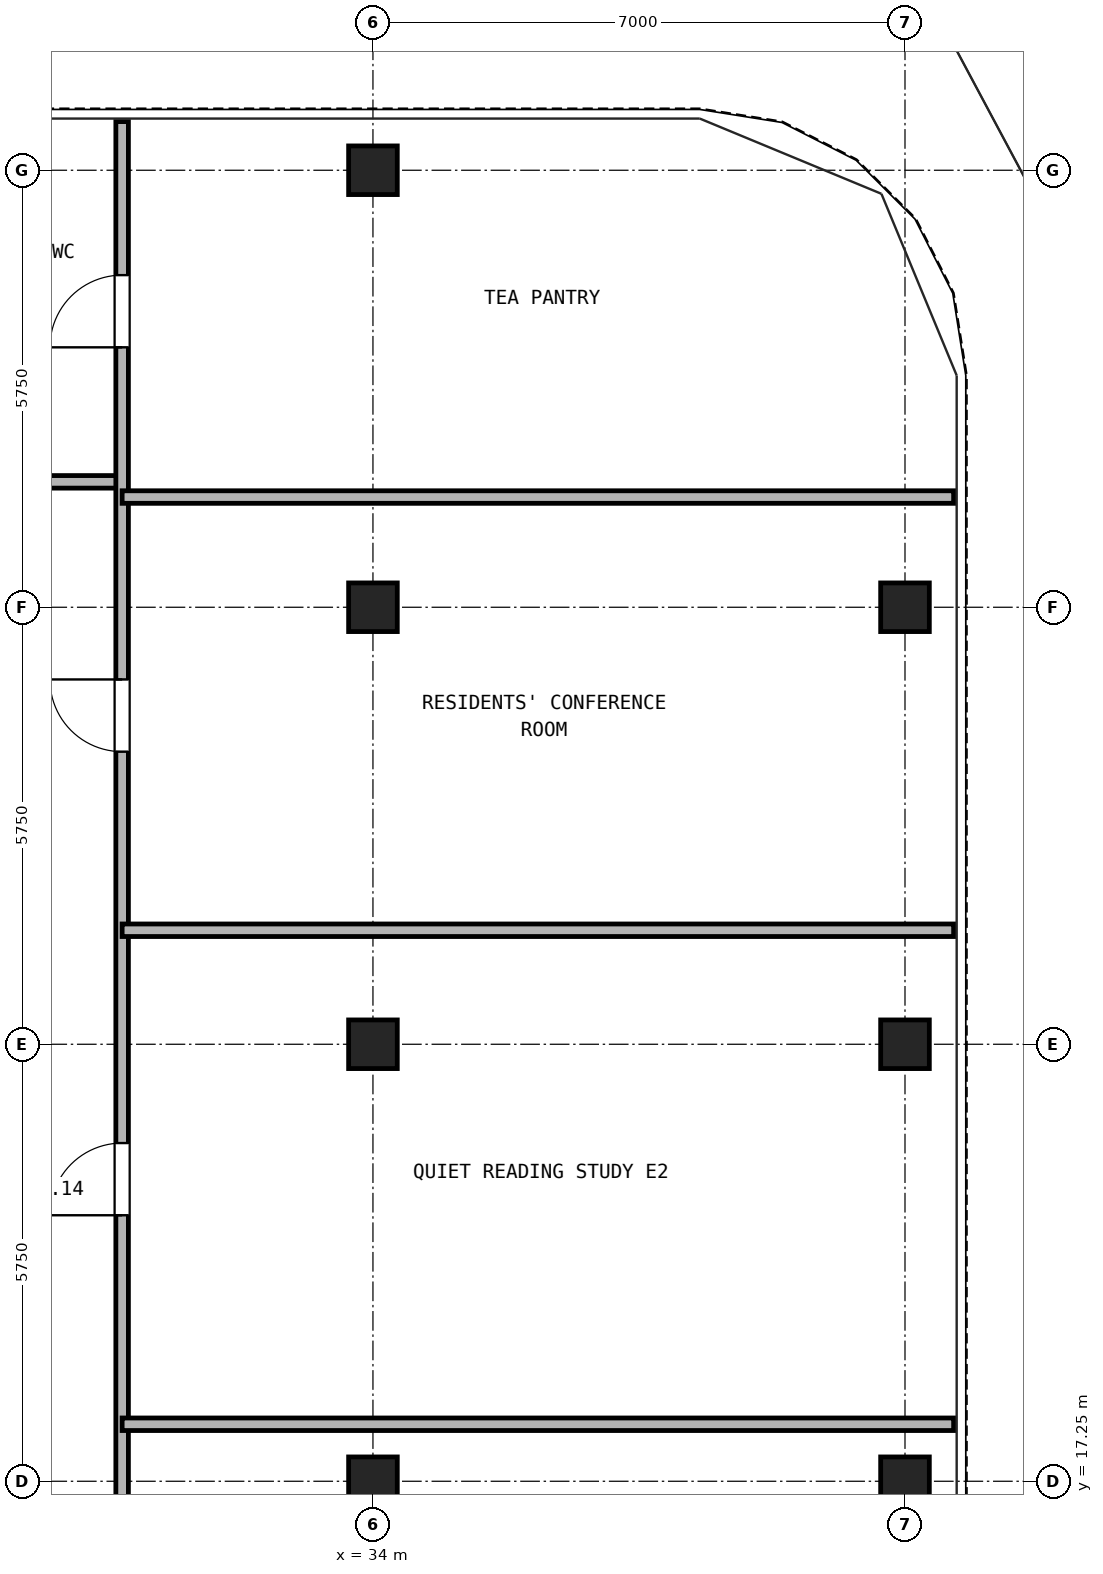
"""IFC4 building model, lengths in metres.
Left out: names, types, materials, properties, quantities, classifications, styles, units other than length and angle.
Written with IfcOpenShell. Run it as: python <this file> out.ifc"""

import sys

from ifc_helpers import new_model, si_unit, direction, frame, frame_2d, origin, origin_2d, place, context, subcontext, project, spatial, rectangle, hollow_rectangle, extrude, source, transform, mapped, element, fill, save


model = new_model("IFC4")
c1 = context("Model", 3, precision=1e-05, world=origin(), true_north=direction((0.0, 1.0)))
c2 = subcontext(c1, "Body", "Model", "MODEL_VIEW")
j1 = project(units=[si_unit("LENGTHUNIT", "METRE"), si_unit("PLANEANGLEUNIT", "RADIAN")], contexts=[c1])
p1 = place(None, origin())
s1 = spatial("IfcSite", under=j1, at=p1, CompositionType="ELEMENT")
p2 = place(p1, origin())
s2 = spatial("IfcBuilding", under=s1, at=p2, CompositionType="ELEMENT")
p3 = place(p2, frame((0.0, 0.0, 220.1)))
s3 = spatial("IfcBuildingStorey", under=s2, at=p3, CompositionType="ELEMENT", Elevation=220.1)
m1 = source(origin(), c2, "Body", "SweptSolid", [
    extrude(hollow_rectangle(XDim=0.64, YDim=0.64, WallThickness=0.035, at=origin_2d()), origin(), (0.0, 0.0, 1.0), 2.98),
])
for number, where, z_axis, x_axis in (
    (1, (34.0, 34.5, 0.0), (0.0, 0.0, 1.0), (1.0, 0.0, 0.0)),
    (2, (41.0, 17.25, 0.0), (0.0, 0.0, 1.0), (1.0, 0.0, 0.0)),
    (3, (41.0, 23.0, 0.0), (0.0, 0.0, 1.0), (1.0, 0.0, 0.0)),
    (4, (41.0, 28.75, 0.0), (0.0, 0.0, 1.0), (1.0, 0.0, 0.0)),
    (5, (34.0, 17.25, 0.0), (0.0, 0.0, 1.0), (1.0, 0.0, 0.0)),
    (6, (34.0, 23.0, 0.0), (0.0, 0.0, 1.0), (1.0, 0.0, 0.0)),
    (7, (34.0, 28.75, 0.0), (0.0, 0.0, 1.0), (1.0, 0.0, 0.0)),
):
    element("IfcColumn", number, at=place(p3, frame(where, z_axis=z_axis, x_axis=x_axis)), inside=s3, PredefinedType="COLUMN", context=c2, shape_type="MappedRepresentation", body=[
        mapped(m1, transform((0.0, 0.0, 0.0), x_axis=(1.0, 0.0, 0.0), y_axis=(0.0, 1.0, 0.0), z_axis=(0.0, 0.0, 1.0), scale=1.0)),
    ])
p4 = place(p3, frame((16.3, 30.4, 0.0), z_axis=(0.0, 0.0, 1.0), x_axis=(1.0, 0.0, 0.0)))
e8 = element("IfcWall", 8, at=p4, inside=s3, PredefinedType="PARTITIONING", context=c2, shape_type="SweptSolid", body=[
    extrude(rectangle(XDim=14.4, YDim=0.165, at=frame_2d((7.2, 0.0))), origin(), (0.0, 0.0, 1.0), 2.98),
])
p5 = place(p4, frame((2.35, 0.0, 0.0)))
e9 = element("IfcOpeningElement", 9, at=p5, cuts=e8, PredefinedType="OPENING", context=c2, shape_type="SweptSolid", body=[
    extrude(rectangle(XDim=0.95, YDim=2.15, at=frame_2d((0.475, 1.075))), frame((0.0, 0.093, 0.0), z_axis=(0.0, -1.0, 0.0), x_axis=(1.0, 0.0, 0.0)), (0.0, 0.0, 1.0), 0.185),
])
p6 = place(p4, frame((7.25, 0.0, 0.0)))
e10 = element("IfcOpeningElement", 10, at=p6, cuts=e8, PredefinedType="OPENING", context=c2, shape_type="SweptSolid", body=[
    extrude(rectangle(XDim=0.95, YDim=2.15, at=frame_2d((0.475, 1.075))), frame((0.0, 0.093, 0.0), z_axis=(0.0, -1.0, 0.0), x_axis=(1.0, 0.0, 0.0)), (0.0, 0.0, 1.0), 0.185),
])
p7 = place(p4, frame((11.6, 0.0, 0.0)))
e11 = element("IfcOpeningElement", 11, at=p7, cuts=e8, PredefinedType="OPENING", context=c2, shape_type="SweptSolid", body=[
    extrude(rectangle(XDim=0.92, YDim=2.1, at=frame_2d((0.46, 1.05))), frame((0.0, 0.093, 0.0), z_axis=(0.0, -1.0, 0.0), x_axis=(1.0, 0.0, 0.0)), (0.0, 0.0, 1.0), 0.185),
])
p8 = place(p3, frame((30.7, 10.9, 0.0), z_axis=(0.0, 0.0, 1.0), x_axis=(0.0, 1.0, 0.0)))
e12 = element("IfcWall", 12, at=p8, inside=s3, PredefinedType="PARTITIONING", context=c2, shape_type="SweptSolid", body=[
    extrude(rectangle(XDim=24.24, YDim=0.165, at=frame_2d((12.12, 0.0))), origin(), (0.0, 0.0, 1.0), 2.98),
])
p9 = place(p8, frame((3.05, 0.0, 0.0)))
e13 = element("IfcOpeningElement", 13, at=p9, cuts=e12, PredefinedType="OPENING", context=c2, shape_type="SweptSolid", body=[
    extrude(rectangle(XDim=0.95, YDim=2.15, at=frame_2d((0.475, 1.075))), frame((0.0, 0.093, 0.0), z_axis=(0.0, -1.0, 0.0), x_axis=(1.0, 0.0, 0.0)), (0.0, 0.0, 1.0), 0.185),
])
p10 = place(p8, frame((9.85, 0.0, 0.0)))
e14 = element("IfcOpeningElement", 14, at=p10, cuts=e12, PredefinedType="OPENING", context=c2, shape_type="SweptSolid", body=[
    extrude(rectangle(XDim=0.95, YDim=2.15, at=frame_2d((0.475, 1.075))), frame((0.0, 0.093, 0.0), z_axis=(0.0, -1.0, 0.0), x_axis=(1.0, 0.0, 0.0)), (0.0, 0.0, 1.0), 0.185),
])
p11 = place(p8, frame((15.95, 0.0, 0.0)))
e15 = element("IfcOpeningElement", 15, at=p11, cuts=e12, PredefinedType="OPENING", context=c2, shape_type="SweptSolid", body=[
    extrude(rectangle(XDim=0.95, YDim=2.15, at=frame_2d((0.475, 1.075))), frame((0.0, 0.093, 0.0), z_axis=(0.0, -1.0, 0.0), x_axis=(1.0, 0.0, 0.0)), (0.0, 0.0, 1.0), 0.185),
])
p12 = place(p8, frame((21.27, 0.0, 0.0)))
e16 = element("IfcOpeningElement", 16, at=p12, cuts=e12, PredefinedType="OPENING", context=c2, shape_type="SweptSolid", body=[
    extrude(rectangle(XDim=0.95, YDim=2.15, at=frame_2d((0.475, 1.075))), frame((0.0, 0.093, 0.0), z_axis=(0.0, -1.0, 0.0), x_axis=(1.0, 0.0, 0.0)), (0.0, 0.0, 1.0), 0.185),
])
for number, where, z_axis, x_axis in (
    (17, (30.7, 18.0, 0.0), (0.0, 0.0, 1.0), (1.0, 0.0, 0.0)),
    (18, (30.7, 24.5, 0.0), (0.0, 0.0, 1.0), (1.0, 0.0, 0.0)),
    (19, (30.7, 30.2, 0.0), (0.0, 0.0, 1.0), (1.0, 0.0, 0.0)),
):
    element("IfcWall", number, at=place(p3, frame(where, z_axis=z_axis, x_axis=x_axis)), inside=s3, PredefinedType="PARTITIONING", context=c2, shape_type="SweptSolid", body=[
        extrude(rectangle(XDim=10.94, YDim=0.165, at=frame_2d((5.47, 0.0))), origin(), (0.0, 0.0, 1.0), 2.98),
    ])
p13 = place(p10, origin())
e20 = element("IfcDoor", 20, at=p13, inside=s3, OperationType="SINGLE_SWING_LEFT", PredefinedType="DOOR", context=c2, shape_type="SweptSolid", body=[
    extrude(rectangle(XDim=0.95, YDim=2.15, at=frame_2d((0.475, 1.075))), frame((0.0, 0.025, 0.0), z_axis=(0.0, -1.0, 0.0), x_axis=(1.0, 0.0, 0.0)), (0.0, 0.0, 1.0), 0.05),
])
fill(e14, e20)
p14 = place(p11, origin())
e21 = element("IfcDoor", 21, at=p14, inside=s3, OperationType="SINGLE_SWING_RIGHT", PredefinedType="DOOR", context=c2, shape_type="SweptSolid", body=[
    extrude(rectangle(XDim=0.95, YDim=2.15, at=frame_2d((0.475, 1.075))), frame((0.0, 0.025, 0.0), z_axis=(0.0, -1.0, 0.0), x_axis=(1.0, 0.0, 0.0)), (0.0, 0.0, 1.0), 0.05),
])
fill(e15, e21)
p15 = place(p12, origin())
e22 = element("IfcDoor", 22, at=p15, inside=s3, OperationType="SINGLE_SWING_LEFT", PredefinedType="DOOR", context=c2, shape_type="SweptSolid", body=[
    extrude(rectangle(XDim=0.95, YDim=2.15, at=frame_2d((0.475, 1.075))), frame((0.0, 0.025, 0.0), z_axis=(0.0, -1.0, 0.0), x_axis=(1.0, 0.0, 0.0)), (0.0, 0.0, 1.0), 0.05),
])
fill(e16, e22)
save(model, sys.argv[1])
